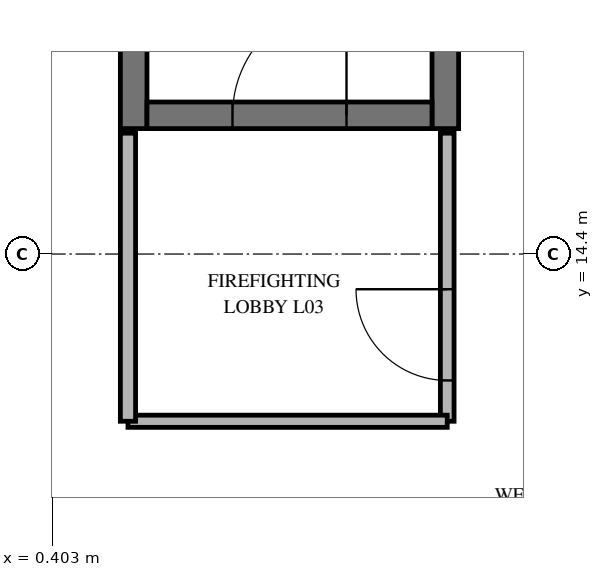
"""IFC4 building model, lengths in metres.
Left out: names, types, materials, properties, quantities, classifications, styles, units other than length and angle.
Written with IfcOpenShell. Run it as: python <this file> out.ifc"""

import sys

from ifc_helpers import new_model, si_unit, direction, frame, frame_2d, origin, place, context, subcontext, project, spatial, rectangle, extrude, element, fill, save


model = new_model("IFC4")
c1 = context("Model", 3, precision=1e-05, world=origin(), true_north=direction((0.0, 1.0)))
c2 = subcontext(c1, "Body", "Model", "MODEL_VIEW")
j1 = project(units=[si_unit("LENGTHUNIT", "METRE"), si_unit("PLANEANGLEUNIT", "RADIAN")], contexts=[c1])
p1 = place(None, origin())
s1 = spatial("IfcSite", under=j1, at=p1, CompositionType="ELEMENT")
p2 = place(p1, origin())
s2 = spatial("IfcBuilding", under=s1, at=p2, CompositionType="ELEMENT")
p3 = place(p2, frame((0.0, 0.0, 12.9)))
s3 = spatial("IfcBuildingStorey", under=s2, at=p3, CompositionType="ELEMENT", Elevation=12.9)
for number, where, z_axis, x_axis in (
    (1, (5.575, 16.05, 0.0), (0.0, 0.0, 1.0), (0.0, 1.0, 0.0)),
    (2, (1.475, 25.15, 0.0), (0.0, 0.0, 1.0), (0.0, -1.0, 0.0)),
):
    element("IfcWall", number, at=place(p3, frame(where, z_axis=z_axis, x_axis=x_axis)), inside=s3, PredefinedType="SHEAR", context=c2, shape_type="SweptSolid", body=[
        extrude(rectangle(XDim=9.1, YDim=0.35, at=frame_2d((4.55, 0.0))), origin(), (0.0, 0.0, 1.0), 3.66),
    ])
p4 = place(p3, frame((1.65, 16.225, 0.0), z_axis=(0.0, 0.0, 1.0), x_axis=(1.0, 0.0, 0.0)))
e3 = element("IfcWall", 3, at=p4, inside=s3, PredefinedType="SHEAR", context=c2, shape_type="SweptSolid", body=[
    extrude(rectangle(XDim=3.75, YDim=0.35, at=frame_2d((1.875, 0.0))), origin(), (0.0, 0.0, 1.0), 3.66),
])
p5 = place(p4, frame((1.125, 0.0, 0.0)))
e4 = element("IfcOpeningElement", 4, at=p5, cuts=e3, PredefinedType="OPENING", context=c2, shape_type="SweptSolid", body=[
    extrude(rectangle(XDim=1.5, YDim=2.2, at=frame_2d((0.75, 1.1))), frame((0.0, 0.185, 0.0), z_axis=(0.0, -1.0, 0.0), x_axis=(1.0, 0.0, 0.0)), (0.0, 0.0, 1.0), 0.37),
])
p6 = place(p3, frame((5.6, 12.2, 0.0), z_axis=(0.0, 0.0, 1.0), x_axis=(0.0, 1.0, 0.0)))
e5 = element("IfcWall", 5, at=p6, inside=s3, PredefinedType="PARTITIONING", context=c2, shape_type="SweptSolid", body=[
    extrude(rectangle(XDim=3.79, YDim=0.18, at=frame_2d((1.895, 0.0))), origin(), (0.0, 0.0, 1.0), 3.66),
])
p7 = place(p6, frame((0.537, 0.0, 0.0)))
e6 = element("IfcOpeningElement", 6, at=p7, cuts=e5, PredefinedType="OPENING", context=c2, shape_type="SweptSolid", body=[
    extrude(rectangle(XDim=1.2, YDim=2.2, at=frame_2d((0.6, 1.1))), frame((0.0, 0.1, 0.0), z_axis=(0.0, -1.0, 0.0), x_axis=(1.0, 0.0, 0.0)), (0.0, 0.0, 1.0), 0.2),
])
p8 = place(p3, frame((1.4, 12.2, 0.0), z_axis=(0.0, 0.0, 1.0), x_axis=(1.0, 0.0, 0.0)))
e7 = element("IfcWall", 7, at=p8, inside=s3, PredefinedType="PARTITIONING", context=c2, shape_type="SweptSolid", body=[
    extrude(rectangle(XDim=4.2, YDim=0.16, at=frame_2d((2.1, 0.0))), origin(), (0.0, 0.0, 1.0), 3.66),
])
p9 = place(p3, frame((1.4, 15.99, 0.0), z_axis=(0.0, 0.0, 1.0), x_axis=(0.0, -1.0, 0.0)))
e8 = element("IfcWall", 8, at=p9, inside=s3, PredefinedType="PARTITIONING", context=c2, shape_type="SweptSolid", body=[
    extrude(rectangle(XDim=3.79, YDim=0.2, at=frame_2d((1.895, 0.0))), origin(), (0.0, 0.0, 1.0), 3.66),
])
p10 = place(p5, origin())
e9 = element("IfcDoor", 9, at=p10, inside=s3, OperationType="SINGLE_SWING_RIGHT", PredefinedType="DOOR", context=c2, shape_type="SweptSolid", body=[
    extrude(rectangle(XDim=1.5, YDim=2.2, at=frame_2d((0.75, 1.1))), frame((0.0, 0.025, 0.0), z_axis=(0.0, -1.0, 0.0), x_axis=(1.0, 0.0, 0.0)), (0.0, 0.0, 1.0), 0.05),
])
fill(e4, e9)
p11 = place(p7, origin())
e10 = element("IfcDoor", 10, at=p11, inside=s3, OperationType="SINGLE_SWING_RIGHT", PredefinedType="DOOR", context=c2, shape_type="SweptSolid", body=[
    extrude(rectangle(XDim=1.2, YDim=2.2, at=frame_2d((0.6, 1.1))), frame((0.0, 0.025, 0.0), z_axis=(0.0, -1.0, 0.0), x_axis=(1.0, 0.0, 0.0)), (0.0, 0.0, 1.0), 0.05),
])
fill(e6, e10)
save(model, sys.argv[1])
